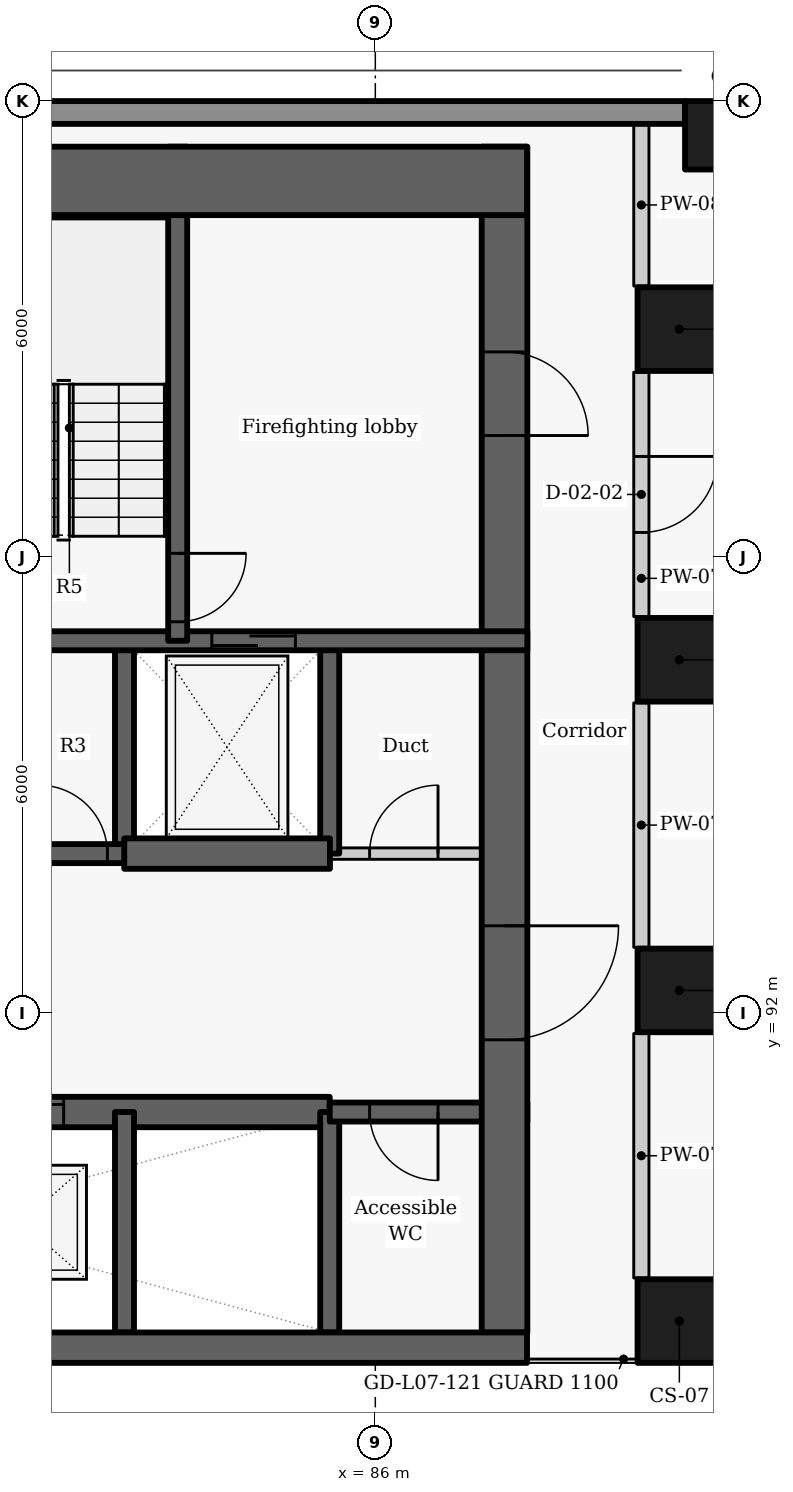
"""IFC4 building model, lengths in metres.
Left out: names, types, materials, properties, quantities, classifications, styles, units other than length and angle.
Written with IfcOpenShell. Run it as: python <this file> out.ifc"""

import sys

from ifc_helpers import new_model, si_unit, direction, frame, frame_2d, origin, origin_2d, place, context, subcontext, project, spatial, rectangle, extrude, element, fill, save


model = new_model("IFC4")
c1 = context("Model", 3, precision=1e-05, world=origin(), true_north=direction((0.0, 1.0)))
c2 = subcontext(c1, "Body", "Model", "MODEL_VIEW")
j1 = project(units=[si_unit("LENGTHUNIT", "METRE"), si_unit("PLANEANGLEUNIT", "RADIAN")], contexts=[c1])
p1 = place(None, origin())
s1 = spatial("IfcSite", under=j1, at=p1, CompositionType="ELEMENT")
p2 = place(p1, origin())
s2 = spatial("IfcBuilding", under=s1, at=p2, CompositionType="ELEMENT")
p3 = place(p2, frame((0.0, 0.0, 31.5)))
s3 = spatial("IfcBuildingStorey", under=s2, at=p3, CompositionType="ELEMENT", Elevation=31.5)
p4 = place(p3, frame((90.825, 103.55, 0.0), z_axis=(0.0, 0.0, 1.0), x_axis=(-1.0, 0.0, 0.0)))
e1 = element("IfcColumn", 1, at=p4, inside=s3, PredefinedType="COLUMN", context=c2, shape_type="SweptSolid", body=[
    extrude(rectangle(XDim=1.5, YDim=0.9, at=origin_2d()), origin(), (0.0, 0.0, 1.0), 3.3),
])
for number, where, z_axis, x_axis in (
    (2, (90.0, 87.95, 0.0), (0.0, 0.0, 1.0), (0.0, 1.0, 0.0)),
    (3, (90.0, 92.3, 0.0), (0.0, 0.0, 1.0), (0.0, 1.0, 0.0)),
    (4, (90.0, 96.65, 0.0), (0.0, 0.0, 1.0), (0.0, 1.0, 0.0)),
    (5, (90.0, 101.0, 0.0), (0.0, 0.0, 1.0), (0.0, 1.0, 0.0)),
):
    element("IfcColumn", number, at=place(p3, frame(where, z_axis=z_axis, x_axis=x_axis)), inside=s3, PredefinedType="COLUMN", context=c2, shape_type="SweptSolid", body=[
        extrude(rectangle(XDim=1.1, YDim=1.1, at=origin_2d()), origin(), (0.0, 0.0, 1.0), 3.3),
    ])
p5 = place(p3, frame((90.079, 103.85, 0.0), z_axis=(0.0, 0.0, 1.0), x_axis=(-1.0, 0.0, 0.0)))
e6 = element("IfcWall", 6, at=p5, inside=s3, PredefinedType="SOLIDWALL", context=c2, shape_type="SweptSolid", body=[
    extrude(rectangle(XDim=20.19, YDim=0.3, at=frame_2d((10.095, 0.0))), origin(), (0.0, 0.0, 1.0), 2.425),
])
p6 = place(p3, frame((74.6, 90.7, -0.275), z_axis=(0.0, 0.0, 1.0), x_axis=(1.0, 0.0, 0.0)))
e7 = element("IfcWall", 7, at=p6, inside=s3, PredefinedType="SHEAR", context=c2, shape_type="SweptSolid", body=[
    extrude(rectangle(XDim=10.8, YDim=0.4, at=frame_2d((5.4, 0.0))), origin(), (0.0, 0.0, 1.0), 3.3),
])
p7 = place(p6, frame((0.8, 0.0, 0.275)))
e8 = element("IfcOpeningElement", 8, at=p7, cuts=e7, PredefinedType="OPENING", context=c2, shape_type="SweptSolid", body=[
    extrude(rectangle(XDim=1.1, YDim=2.1, at=frame_2d((0.55, 1.05))), frame((0.0, 0.21, 0.0), z_axis=(0.0, -1.0, 0.0), x_axis=(1.0, 0.0, 0.0)), (0.0, 0.0, 1.0), 0.42),
])
p8 = place(p6, frame((3.5, 0.0, 0.275)))
e9 = element("IfcOpeningElement", 9, at=p8, cuts=e7, PredefinedType="OPENING", context=c2, shape_type="SweptSolid", body=[
    extrude(rectangle(XDim=1.1, YDim=2.1, at=frame_2d((0.55, 1.05))), frame((0.0, 0.21, 0.0), z_axis=(0.0, -1.0, 0.0), x_axis=(1.0, 0.0, 0.0)), (0.0, 0.0, 1.0), 0.42),
])
p9 = place(p6, frame((6.2, 0.0, 0.275)))
e10 = element("IfcOpeningElement", 10, at=p9, cuts=e7, PredefinedType="OPENING", context=c2, shape_type="SweptSolid", body=[
    extrude(rectangle(XDim=1.1, YDim=2.1, at=frame_2d((0.55, 1.05))), frame((0.0, 0.21, 0.0), z_axis=(0.0, -1.0, 0.0), x_axis=(1.0, 0.0, 0.0)), (0.0, 0.0, 1.0), 0.42),
])
p10 = place(p3, frame((82.7, 87.8, -0.275), z_axis=(0.0, 0.0, 1.0), x_axis=(0.0, 1.0, 0.0)))
e11 = element("IfcWall", 11, at=p10, inside=s3, PredefinedType="SHEAR", context=c2, shape_type="SweptSolid", body=[
    extrude(rectangle(XDim=2.9, YDim=0.25, at=frame_2d((1.45, 0.0))), origin(), (0.0, 0.0, 1.0), 3.3),
])
p11 = place(p3, frame((82.7, 94.1, -0.275), z_axis=(0.0, 0.0, 1.0), x_axis=(0.0, 1.0, 0.0)))
e12 = element("IfcWall", 12, at=p11, inside=s3, PredefinedType="SHEAR", context=c2, shape_type="SweptSolid", body=[
    extrude(rectangle(XDim=2.8, YDim=0.25, at=frame_2d((1.4, 0.0))), origin(), (0.0, 0.0, 1.0), 3.3),
])
p12 = place(p3, frame((85.4, 87.8, -0.275), z_axis=(0.0, 0.0, 1.0), x_axis=(0.0, 1.0, 0.0)))
e13 = element("IfcWall", 13, at=p12, inside=s3, PredefinedType="SHEAR", context=c2, shape_type="SweptSolid", body=[
    extrude(rectangle(XDim=2.9, YDim=0.25, at=frame_2d((1.45, 0.0))), origin(), (0.0, 0.0, 1.0), 3.3),
])
p13 = place(p3, frame((85.4, 94.1, -0.275), z_axis=(0.0, 0.0, 1.0), x_axis=(0.0, 1.0, 0.0)))
e14 = element("IfcWall", 14, at=p13, inside=s3, PredefinedType="SHEAR", context=c2, shape_type="SweptSolid", body=[
    extrude(rectangle(XDim=2.8, YDim=0.25, at=frame_2d((1.4, 0.0))), origin(), (0.0, 0.0, 1.0), 3.3),
])
p14 = place(p3, frame((88.0, 90.7, -0.275), z_axis=(0.0, 0.0, 1.0), x_axis=(-1.0, 0.0, 0.0)))
e15 = element("IfcWall", 15, at=p14, inside=s3, PredefinedType="SHEAR", context=c2, shape_type="SweptSolid", body=[
    extrude(rectangle(XDim=2.6, YDim=0.25, at=frame_2d((1.3, 0.0))), origin(), (0.0, 0.0, 1.0), 3.3),
])
p15 = place(p14, frame((1.175, 0.0, 0.275)))
e16 = element("IfcOpeningElement", 16, at=p15, cuts=e15, PredefinedType="OPENING", context=c2, shape_type="SweptSolid", body=[
    extrude(rectangle(XDim=0.9, YDim=2.1, at=frame_2d((0.45, 1.05))), frame((0.0, 0.135, 0.0), z_axis=(0.0, -1.0, 0.0), x_axis=(1.0, 0.0, 0.0)), (0.0, 0.0, 1.0), 0.27),
])
p16 = place(p3, frame((87.7, 103.4, -0.275), z_axis=(0.0, 0.0, 1.0), x_axis=(0.0, -1.0, 0.0)))
e17 = element("IfcWall", 17, at=p16, inside=s3, PredefinedType="SHEAR", context=c2, shape_type="SweptSolid", body=[
    extrude(rectangle(XDim=15.6, YDim=0.6, at=frame_2d((7.8, 0.0))), origin(), (0.0, 0.0, 1.0), 3.3),
])
p17 = place(p16, frame((10.25, 0.0, 0.275)))
e18 = element("IfcOpeningElement", 18, at=p17, cuts=e17, PredefinedType="OPENING", context=c2, shape_type="SweptSolid", body=[
    extrude(rectangle(XDim=1.5, YDim=2.1, at=frame_2d((0.75, 1.05))), frame((0.0, 0.31, 0.0), z_axis=(0.0, -1.0, 0.0), x_axis=(1.0, 0.0, 0.0)), (0.0, 0.0, 1.0), 0.62),
])
p18 = place(p16, frame((2.7, 0.0, 0.275)))
e19 = element("IfcOpeningElement", 19, at=p18, cuts=e17, PredefinedType="OPENING", context=c2, shape_type="SweptSolid", body=[
    extrude(rectangle(XDim=1.1, YDim=2.1, at=frame_2d((0.55, 1.05))), frame((0.0, 0.31, 0.0), z_axis=(0.0, -1.0, 0.0), x_axis=(1.0, 0.0, 0.0)), (0.0, 0.0, 1.0), 0.62),
])
p19 = place(p3, frame((85.397, 94.1, 0.0), z_axis=(0.0, 0.0, 1.0), x_axis=(1.0, 0.0, 0.0)))
e20 = element("IfcWall", 20, at=p19, inside=s3, PredefinedType="PARTITIONING", context=c2, shape_type="SweptSolid", body=[
    extrude(rectangle(XDim=2.603, YDim=0.15, at=frame_2d((1.302, 0.0))), origin(), (0.0, 0.0, 1.0), 3.025),
])
p20 = place(p19, frame((0.528, 0.0, 0.0)))
e21 = element("IfcOpeningElement", 21, at=p20, cuts=e20, PredefinedType="OPENING", context=c2, shape_type="SweptSolid", body=[
    extrude(rectangle(XDim=0.9, YDim=2.1, at=frame_2d((0.45, 1.05))), frame((0.0, 0.085, 0.0), z_axis=(0.0, -1.0, 0.0), x_axis=(1.0, 0.0, 0.0)), (0.0, 0.0, 1.0), 0.17),
])
p21 = place(p3, frame((79.997, 94.1, -0.275), z_axis=(0.0, 0.0, 1.0), x_axis=(1.0, 0.0, 0.0)))
e22 = element("IfcWall", 22, at=p21, inside=s3, PredefinedType="SHEAR", context=c2, shape_type="SweptSolid", body=[
    extrude(rectangle(XDim=2.706, YDim=0.25, at=frame_2d((1.353, 0.0))), origin(), (0.0, 0.0, 1.0), 3.3),
])
p22 = place(p21, frame((0.228, 0.0, 0.275)))
e23 = element("IfcOpeningElement", 23, at=p22, cuts=e22, PredefinedType="OPENING", context=c2, shape_type="SweptSolid", body=[
    extrude(rectangle(XDim=0.9, YDim=2.1, at=frame_2d((0.45, 1.05))), frame((0.0, 0.135, 0.0), z_axis=(0.0, -1.0, 0.0), x_axis=(1.0, 0.0, 0.0)), (0.0, 0.0, 1.0), 0.27),
])
p23 = place(p21, frame((1.578, 0.0, 0.275)))
e24 = element("IfcOpeningElement", 24, at=p23, cuts=e22, PredefinedType="OPENING", context=c2, shape_type="SweptSolid", body=[
    extrude(rectangle(XDim=0.9, YDim=2.1, at=frame_2d((0.45, 1.05))), frame((0.0, 0.135, 0.0), z_axis=(0.0, -1.0, 0.0), x_axis=(1.0, 0.0, 0.0)), (0.0, 0.0, 1.0), 0.27),
])
p24 = place(p3, frame((82.697, 94.1, -0.275), z_axis=(0.0, 0.0, 1.0), x_axis=(1.0, 0.0, 0.0)))
e25 = element("IfcWall", 25, at=p24, inside=s3, PredefinedType="SHEAR", context=c2, shape_type="SweptSolid", body=[
    extrude(rectangle(XDim=2.706, YDim=0.4, at=frame_2d((1.353, 0.0))), origin(), (0.0, 0.0, 1.0), 3.3),
])
p25 = place(p3, frame((80.0, 96.9, -0.275), z_axis=(0.0, 0.0, 1.0), x_axis=(1.0, 0.0, 0.0)))
e26 = element("IfcWall", 26, at=p25, inside=s3, PredefinedType="SHEAR", context=c2, shape_type="SweptSolid", body=[
    extrude(rectangle(XDim=8.0, YDim=0.25, at=frame_2d((4.0, 0.0))), origin(), (0.0, 0.0, 1.0), 3.3),
])
p26 = place(p25, frame((3.849, 0.0, 0.275)))
e27 = element("IfcOpeningElement", 27, at=p26, cuts=e26, PredefinedType="OPENING", context=c2, shape_type="SweptSolid", body=[
    extrude(rectangle(XDim=1.1, YDim=2.1, at=frame_2d((0.55, 1.05))), frame((0.0, 0.135, 0.0), z_axis=(0.0, -1.0, 0.0), x_axis=(1.0, 0.0, 0.0)), (0.0, 0.0, 1.0), 0.27),
])
p27 = place(p3, frame((83.4, 103.4, -0.275), z_axis=(0.0, 0.0, 1.0), x_axis=(0.0, -1.0, 0.0)))
e28 = element("IfcWall", 28, at=p27, inside=s3, PredefinedType="SHEAR", context=c2, shape_type="SweptSolid", body=[
    extrude(rectangle(XDim=6.5, YDim=0.25, at=frame_2d((3.25, 0.0))), origin(), (0.0, 0.0, 1.0), 3.3),
])
p28 = place(p27, frame((5.35, 0.0, 0.275)))
e29 = element("IfcOpeningElement", 29, at=p28, cuts=e28, PredefinedType="OPENING", context=c2, shape_type="SweptSolid", body=[
    extrude(rectangle(XDim=0.9, YDim=2.1, at=frame_2d((0.45, 1.05))), frame((0.0, 0.135, 0.0), z_axis=(0.0, -1.0, 0.0), x_axis=(1.0, 0.0, 0.0)), (0.0, 0.0, 1.0), 0.27),
])
p29 = place(p3, frame((89.5, 88.517, 0.0), z_axis=(0.0, 0.0, 1.0), x_axis=(0.0, 1.0, 0.0)))
e30 = element("IfcWall", 30, at=p29, inside=s3, PredefinedType="PARTITIONING", context=c2, shape_type="SweptSolid", body=[
    extrude(rectangle(XDim=3.216, YDim=0.2, at=frame_2d((1.608, 0.0))), origin(), (0.0, 0.0, 1.0), 3.025),
])
p30 = place(p3, frame((89.5, 92.867, 0.0), z_axis=(0.0, 0.0, 1.0), x_axis=(0.0, 1.0, 0.0)))
e31 = element("IfcWall", 31, at=p30, inside=s3, PredefinedType="PARTITIONING", context=c2, shape_type="SweptSolid", body=[
    extrude(rectangle(XDim=3.216, YDim=0.2, at=frame_2d((1.608, 0.0))), origin(), (0.0, 0.0, 1.0), 3.025),
])
p31 = place(p3, frame((89.5, 100.433, 0.0), z_axis=(0.0, 0.0, 1.0), x_axis=(0.0, -1.0, 0.0)))
e32 = element("IfcWall", 32, at=p31, inside=s3, PredefinedType="PARTITIONING", context=c2, shape_type="SweptSolid", body=[
    extrude(rectangle(XDim=3.216, YDim=0.2, at=frame_2d((1.608, 0.0))), origin(), (0.0, 0.0, 1.0), 3.025),
])
p32 = place(p31, frame((1.108, 0.0, 0.0)))
e33 = element("IfcOpeningElement", 33, at=p32, cuts=e32, PredefinedType="OPENING", context=c2, shape_type="SweptSolid", body=[
    extrude(rectangle(XDim=1.0, YDim=2.1, at=frame_2d((0.5, 1.05))), frame((0.0, 0.11, 0.0), z_axis=(0.0, -1.0, 0.0), x_axis=(1.0, 0.0, 0.0)), (0.0, 0.0, 1.0), 0.22),
])
p33 = place(p3, frame((89.5, 101.567, 0.0), z_axis=(0.0, 0.0, 1.0), x_axis=(0.0, 1.0, 0.0)))
e34 = element("IfcWall", 34, at=p33, inside=s3, PredefinedType="PARTITIONING", context=c2, shape_type="SweptSolid", body=[
    extrude(rectangle(XDim=2.133, YDim=0.2, at=frame_2d((1.066, 0.0))), origin(), (0.0, 0.0, 1.0), 3.025),
])
p34 = place(p3, frame((72.004, 87.6, -0.275), z_axis=(0.0, 0.0, 1.0), x_axis=(1.0, 0.0, 0.0)))
e35 = element("IfcWall", 35, at=p34, inside=s3, PredefinedType="SHEAR", context=c2, shape_type="SweptSolid", body=[
    extrude(rectangle(XDim=15.992, YDim=0.4, at=frame_2d((7.996, 0.0))), origin(), (0.0, 0.0, 1.0), 3.3),
])
p35 = place(p3, frame((72.004, 102.95, -0.275), z_axis=(0.0, 0.0, 1.0), x_axis=(1.0, 0.0, 0.0)))
e36 = element("IfcWall", 36, at=p35, inside=s3, PredefinedType="SHEAR", context=c2, shape_type="SweptSolid", body=[
    extrude(rectangle(XDim=15.992, YDim=0.9, at=frame_2d((7.996, 0.0))), origin(), (0.0, 0.0, 1.0), 3.3),
])
p36 = place(p9, origin())
e37 = element("IfcDoor", 37, at=p36, inside=s3, OperationType="SLIDING_TO_LEFT", PredefinedType="DOOR", context=c2, shape_type="SweptSolid", body=[
    extrude(rectangle(XDim=1.1, YDim=2.1, at=frame_2d((0.55, 1.05))), frame((0.0, 0.025, 0.0), z_axis=(0.0, -1.0, 0.0), x_axis=(1.0, 0.0, 0.0)), (0.0, 0.0, 1.0), 0.05),
])
fill(e10, e37)
p37 = place(p15, origin())
e38 = element("IfcDoor", 38, at=p37, inside=s3, OperationType="SINGLE_SWING_LEFT", PredefinedType="DOOR", context=c2, shape_type="SweptSolid", body=[
    extrude(rectangle(XDim=0.9, YDim=2.1, at=frame_2d((0.45, 1.05))), frame((0.0, 0.025, 0.0), z_axis=(0.0, -1.0, 0.0), x_axis=(1.0, 0.0, 0.0)), (0.0, 0.0, 1.0), 0.05),
])
fill(e16, e38)
p38 = place(p23, origin())
e39 = element("IfcDoor", 39, at=p38, inside=s3, OperationType="SINGLE_SWING_LEFT", PredefinedType="DOOR", context=c2, shape_type="SweptSolid", body=[
    extrude(rectangle(XDim=0.9, YDim=2.1, at=frame_2d((0.45, 1.05))), frame((0.0, 0.025, 0.0), z_axis=(0.0, -1.0, 0.0), x_axis=(1.0, 0.0, 0.0)), (0.0, 0.0, 1.0), 0.05),
])
fill(e24, e39)
p39 = place(p26, origin())
e40 = element("IfcDoor", 40, at=p39, inside=s3, OperationType="SLIDING_TO_LEFT", PredefinedType="DOOR", context=c2, shape_type="SweptSolid", body=[
    extrude(rectangle(XDim=1.1, YDim=2.1, at=frame_2d((0.55, 1.05))), frame((0.0, 0.025, 0.0), z_axis=(0.0, -1.0, 0.0), x_axis=(1.0, 0.0, 0.0)), (0.0, 0.0, 1.0), 0.05),
])
fill(e27, e40)
p40 = place(p20, origin())
e41 = element("IfcDoor", 41, at=p40, inside=s3, OperationType="SINGLE_SWING_RIGHT", PredefinedType="DOOR", context=c2, shape_type="SweptSolid", body=[
    extrude(rectangle(XDim=0.9, YDim=2.1, at=frame_2d((0.45, 1.05))), frame((0.0, 0.025, 0.0), z_axis=(0.0, -1.0, 0.0), x_axis=(1.0, 0.0, 0.0)), (0.0, 0.0, 1.0), 0.05),
])
fill(e21, e41)
p41 = place(p28, origin())
e42 = element("IfcDoor", 42, at=p41, inside=s3, OperationType="SINGLE_SWING_LEFT", PredefinedType="DOOR", context=c2, shape_type="SweptSolid", body=[
    extrude(rectangle(XDim=0.9, YDim=2.1, at=frame_2d((0.45, 1.05))), frame((0.0, 0.025, 0.0), z_axis=(0.0, -1.0, 0.0), x_axis=(1.0, 0.0, 0.0)), (0.0, 0.0, 1.0), 0.05),
])
fill(e29, e42)
p42 = place(p32, origin())
e43 = element("IfcDoor", 43, at=p42, inside=s3, OperationType="SINGLE_SWING_LEFT", PredefinedType="DOOR", context=c2, shape_type="SweptSolid", body=[
    extrude(rectangle(XDim=1.0, YDim=2.1, at=frame_2d((0.5, 1.05))), frame((0.0, 0.025, 0.0), z_axis=(0.0, -1.0, 0.0), x_axis=(1.0, 0.0, 0.0)), (0.0, 0.0, 1.0), 0.05),
])
fill(e33, e43)
p43 = place(p17, origin())
e44 = element("IfcDoor", 44, at=p43, inside=s3, OperationType="DOUBLE_DOOR_SINGLE_SWING", PredefinedType="DOOR", context=c2, shape_type="SweptSolid", body=[
    extrude(rectangle(XDim=1.5, YDim=2.1, at=frame_2d((0.75, 1.05))), frame((0.0, 0.025, 0.0), z_axis=(0.0, -1.0, 0.0), x_axis=(1.0, 0.0, 0.0)), (0.0, 0.0, 1.0), 0.05),
])
fill(e18, e44)
p44 = place(p18, origin())
e45 = element("IfcDoor", 45, at=p44, inside=s3, OperationType="SINGLE_SWING_RIGHT", PredefinedType="DOOR", context=c2, shape_type="SweptSolid", body=[
    extrude(rectangle(XDim=1.1, YDim=2.1, at=frame_2d((0.55, 1.05))), frame((0.0, 0.025, 0.0), z_axis=(0.0, -1.0, 0.0), x_axis=(1.0, 0.0, 0.0)), (0.0, 0.0, 1.0), 0.05),
])
fill(e19, e45)
save(model, sys.argv[1])
